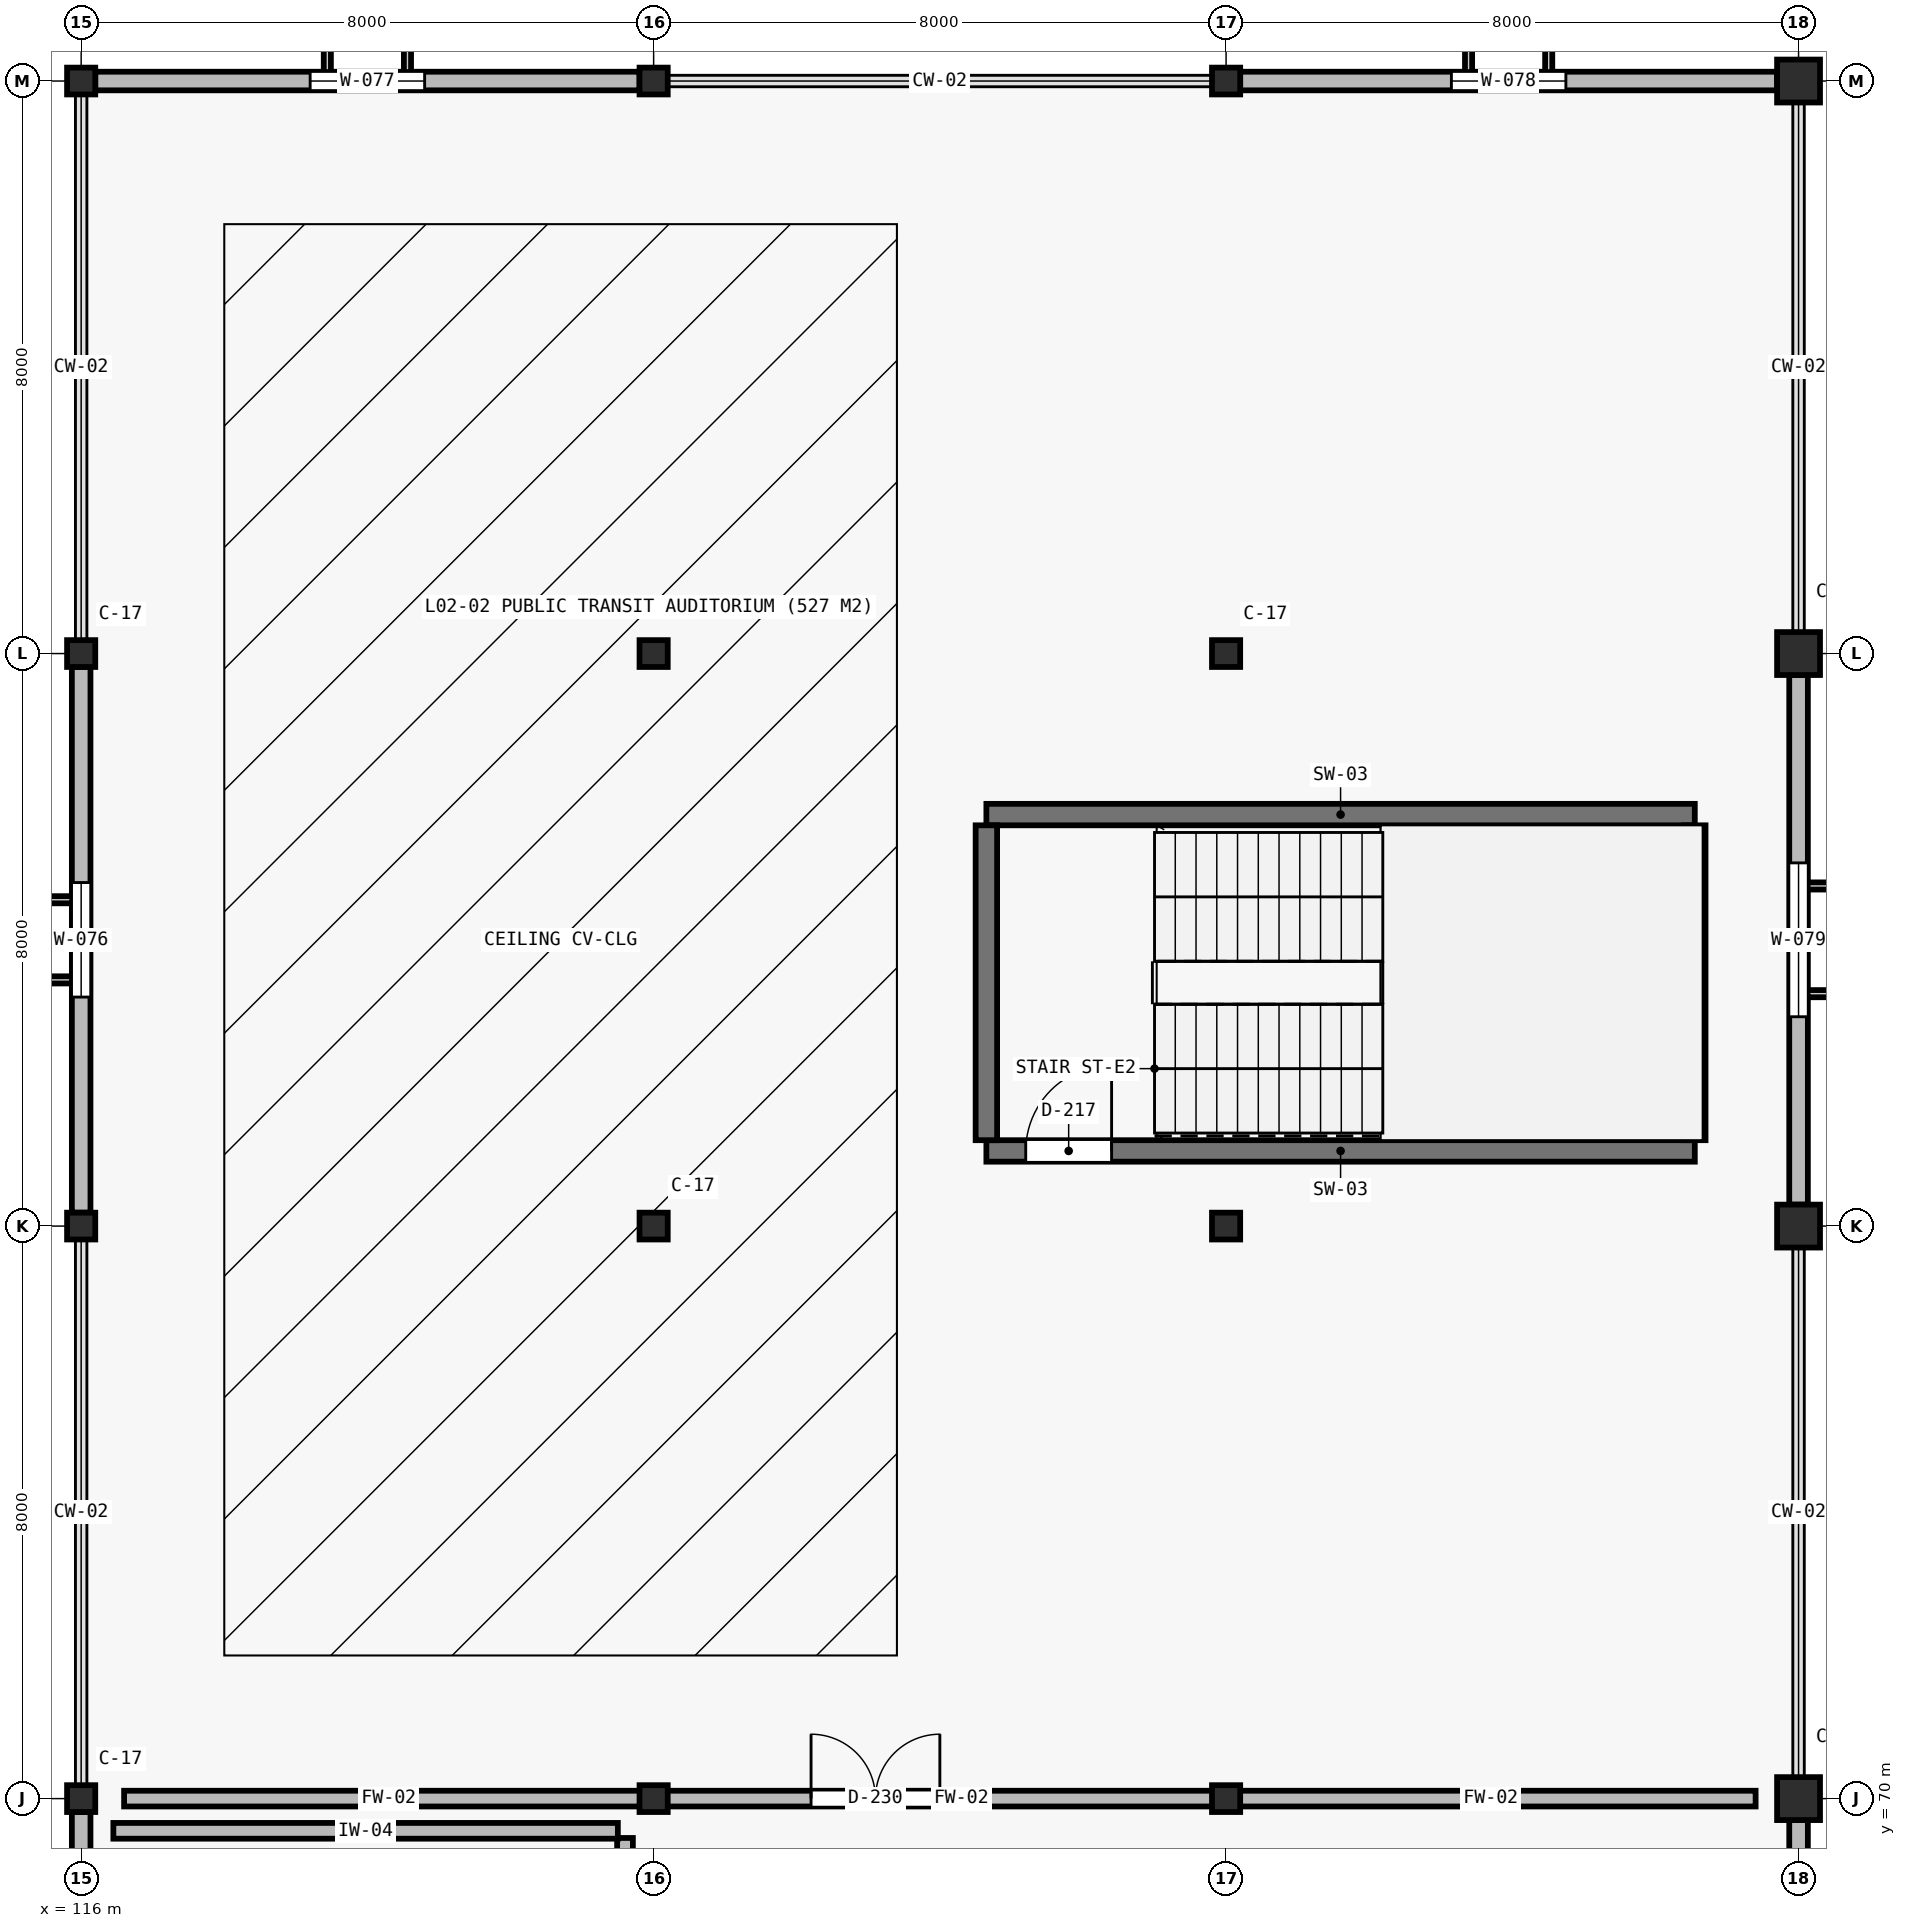
"""IFC4 building model, lengths in metres.
Left out: names, types, materials, properties, quantities, classifications, styles, units other than length and angle.
Written with IfcOpenShell. Run it as: python <this file> out.ifc"""

import sys

from ifc_helpers import new_model, si_unit, direction, frame, frame_2d, origin, origin_2d, place, context, subcontext, project, spatial, rectangle, i_section, extrude, element, fill, save


model = new_model("IFC4")
c1 = context("Model", 3, precision=1e-05, world=origin(), true_north=direction((0.0, 1.0)))
c2 = subcontext(c1, "Body", "Model", "MODEL_VIEW")
j1 = project(units=[si_unit("LENGTHUNIT", "METRE"), si_unit("PLANEANGLEUNIT", "RADIAN")], contexts=[c1])
p1 = place(None, origin())
s1 = spatial("IfcSite", under=j1, at=p1, CompositionType="ELEMENT")
p2 = place(p1, origin())
s2 = spatial("IfcBuilding", under=s1, at=p2, CompositionType="ELEMENT")
p3 = place(p2, frame((0.0, 0.0, 11.2)))
s3 = spatial("IfcBuildingStorey", under=s2, at=p3, CompositionType="ELEMENT", Elevation=11.2)
for number, where, z_axis, x_axis in (
    (1, (116.0, 70.0, 0.0), (0.0, 0.0, 1.0), (1.0, 0.0, 0.0)),
    (2, (116.0, 78.0, 0.0), (0.0, 0.0, 1.0), (1.0, 0.0, 0.0)),
    (3, (116.0, 86.0, 0.0), (0.0, 0.0, 1.0), (1.0, 0.0, 0.0)),
    (4, (116.0, 94.0, 0.0), (0.0, 0.0, 1.0), (1.0, 0.0, 0.0)),
    (5, (124.0, 70.0, 0.0), (0.0, 0.0, 1.0), (1.0, 0.0, 0.0)),
    (6, (124.0, 78.0, 0.0), (0.0, 0.0, 1.0), (1.0, 0.0, 0.0)),
    (7, (124.0, 86.0, 0.0), (0.0, 0.0, 1.0), (1.0, 0.0, 0.0)),
    (8, (124.0, 94.0, 0.0), (0.0, 0.0, 1.0), (1.0, 0.0, 0.0)),
    (9, (132.0, 70.0, 0.0), (0.0, 0.0, 1.0), (1.0, 0.0, 0.0)),
    (10, (132.0, 78.0, 0.0), (0.0, 0.0, 1.0), (1.0, 0.0, 0.0)),
    (11, (132.0, 86.0, 0.0), (0.0, 0.0, 1.0), (1.0, 0.0, 0.0)),
    (12, (132.0, 94.0, 0.0), (0.0, 0.0, 1.0), (1.0, 0.0, 0.0)),
):
    element("IfcColumn", number, at=place(p3, frame(where, z_axis=z_axis, x_axis=x_axis)), inside=s3, PredefinedType="COLUMN", context=c2, shape_type="SweptSolid", body=[
        extrude(i_section(OverallWidth=0.394, OverallDepth=0.375, WebThickness=0.017, FlangeThickness=0.028, at=origin_2d()), origin(), (0.0, 0.0, 1.0), 4.0),
    ])
for number, where, z_axis, x_axis in (
    (13, (140.0, 70.0, 0.0), (0.0, 0.0, 1.0), (1.0, 0.0, 0.0)),
    (14, (140.0, 78.0, 0.0), (0.0, 0.0, 1.0), (1.0, 0.0, 0.0)),
    (15, (140.0, 86.0, 0.0), (0.0, 0.0, 1.0), (1.0, 0.0, 0.0)),
    (16, (140.0, 94.0, 0.0), (0.0, 0.0, 1.0), (1.0, 0.0, 0.0)),
):
    element("IfcColumn", number, at=place(p3, frame(where, z_axis=z_axis, x_axis=x_axis)), inside=s3, PredefinedType="COLUMN", context=c2, shape_type="SweptSolid", body=[
        extrude(rectangle(XDim=0.6, YDim=0.6, at=origin_2d()), origin(), (0.0, 0.0, 1.0), 4.0),
    ])
p4 = place(p3, frame((128.65, 83.75, 0.0), z_axis=(0.0, 0.0, 1.0), x_axis=(1.0, 0.0, 0.0)))
e17 = element("IfcWall", 17, at=p4, inside=s3, PredefinedType="SHEAR", context=c2, shape_type="SweptSolid", body=[
    extrude(rectangle(XDim=9.9, YDim=0.3, at=frame_2d((4.95, 0.0))), origin(), (0.0, 0.0, 1.0), 4.0),
])
p5 = place(p3, frame((128.65, 79.05, 0.0), z_axis=(0.0, 0.0, 1.0), x_axis=(1.0, 0.0, 0.0)))
e18 = element("IfcWall", 18, at=p5, inside=s3, PredefinedType="SHEAR", context=c2, shape_type="SweptSolid", body=[
    extrude(rectangle(XDim=9.9, YDim=0.3, at=frame_2d((4.95, 0.0))), origin(), (0.0, 0.0, 1.0), 4.0),
])
p6 = place(p5, frame((0.55, 0.0, 0.0)))
e19 = element("IfcOpeningElement", 19, at=p6, cuts=e18, PredefinedType="OPENING", context=c2, shape_type="SweptSolid", body=[
    extrude(rectangle(XDim=1.2, YDim=2.2, at=frame_2d((0.6, 1.1))), frame((0.0, 0.16, 0.0), z_axis=(0.0, -1.0, 0.0), x_axis=(1.0, 0.0, 0.0)), (0.0, 0.0, 1.0), 0.32),
])
for number, where, z_axis, x_axis in (
    (20, (128.65, 79.2, 0.0), (0.0, 0.0, 1.0), (0.0, 1.0, 0.0)),
    (21, (138.55, 79.2, 0.0), (0.0, 0.0, 1.0), (0.0, 1.0, 0.0)),
):
    element("IfcWall", number, at=place(p3, frame(where, z_axis=z_axis, x_axis=x_axis)), inside=s3, PredefinedType="SHEAR", context=c2, shape_type="SweptSolid", body=[
        extrude(rectangle(XDim=4.4, YDim=0.3, at=frame_2d((2.2, 0.0))), origin(), (0.0, 0.0, 1.0), 4.0),
    ])
p7 = place(p3, frame((116.0, 62.35, 0.0), z_axis=(0.0, 0.0, 1.0), x_axis=(0.0, 1.0, 0.0)))
e22 = element("IfcWall", 22, at=p7, inside=s3, PredefinedType="STANDARD", context=c2, shape_type="SweptSolid", body=[
    extrude(rectangle(XDim=7.462, YDim=0.26, at=frame_2d((3.731, 0.0))), origin(), (0.0, 0.0, 1.0), 3.25),
])
p8 = place(p7, frame((2.931, 0.0, 0.95)))
e23 = element("IfcOpeningElement", 23, at=p8, cuts=e22, PredefinedType="OPENING", context=c2, shape_type="SweptSolid", body=[
    extrude(rectangle(XDim=1.6, YDim=2.2, at=frame_2d((0.8, 1.1))), frame((0.0, 0.14, 0.0), z_axis=(0.0, -1.0, 0.0), x_axis=(1.0, 0.0, 0.0)), (0.0, 0.0, 1.0), 0.28),
])
p9 = place(p3, frame((116.0, 78.188, 0.0), z_axis=(0.0, 0.0, 1.0), x_axis=(0.0, 1.0, 0.0)))
e24 = element("IfcWall", 24, at=p9, inside=s3, PredefinedType="STANDARD", context=c2, shape_type="SweptSolid", body=[
    extrude(rectangle(XDim=7.625, YDim=0.26, at=frame_2d((3.812, 0.0))), origin(), (0.0, 0.0, 1.0), 3.25),
])
p10 = place(p9, frame((3.012, 0.0, 0.95)))
e25 = element("IfcOpeningElement", 25, at=p10, cuts=e24, PredefinedType="OPENING", context=c2, shape_type="SweptSolid", body=[
    extrude(rectangle(XDim=1.6, YDim=2.2, at=frame_2d((0.8, 1.1))), frame((0.0, 0.14, 0.0), z_axis=(0.0, -1.0, 0.0), x_axis=(1.0, 0.0, 0.0)), (0.0, 0.0, 1.0), 0.28),
])
p11 = place(p3, frame((116.197, 94.0, 0.0), z_axis=(0.0, 0.0, 1.0), x_axis=(1.0, 0.0, 0.0)))
e26 = element("IfcWall", 26, at=p11, inside=s3, PredefinedType="STANDARD", context=c2, shape_type="SweptSolid", body=[
    extrude(rectangle(XDim=7.606, YDim=0.26, at=frame_2d((3.803, 0.0))), origin(), (0.0, 0.0, 1.0), 3.25),
])
p12 = place(p11, frame((3.003, 0.0, 0.95)))
e27 = element("IfcOpeningElement", 27, at=p12, cuts=e26, PredefinedType="OPENING", context=c2, shape_type="SweptSolid", body=[
    extrude(rectangle(XDim=1.6, YDim=2.2, at=frame_2d((0.8, 1.1))), frame((0.0, 0.14, 0.0), z_axis=(0.0, -1.0, 0.0), x_axis=(1.0, 0.0, 0.0)), (0.0, 0.0, 1.0), 0.28),
])
p13 = place(p3, frame((132.197, 94.0, 0.0), z_axis=(0.0, 0.0, 1.0), x_axis=(1.0, 0.0, 0.0)))
e28 = element("IfcWall", 28, at=p13, inside=s3, PredefinedType="STANDARD", context=c2, shape_type="SweptSolid", body=[
    extrude(rectangle(XDim=7.503, YDim=0.26, at=frame_2d((3.751, 0.0))), origin(), (0.0, 0.0, 1.0), 3.25),
])
p14 = place(p13, frame((2.951, 0.0, 0.95)))
e29 = element("IfcOpeningElement", 29, at=p14, cuts=e28, PredefinedType="OPENING", context=c2, shape_type="SweptSolid", body=[
    extrude(rectangle(XDim=1.6, YDim=2.2, at=frame_2d((0.8, 1.1))), frame((0.0, 0.14, 0.0), z_axis=(0.0, -1.0, 0.0), x_axis=(1.0, 0.0, 0.0)), (0.0, 0.0, 1.0), 0.28),
])
p15 = place(p3, frame((140.0, 85.7, 0.0), z_axis=(0.0, 0.0, 1.0), x_axis=(0.0, -1.0, 0.0)))
e30 = element("IfcWall", 30, at=p15, inside=s3, PredefinedType="STANDARD", context=c2, shape_type="SweptSolid", body=[
    extrude(rectangle(XDim=7.4, YDim=0.26, at=frame_2d((3.7, 0.0))), origin(), (0.0, 0.0, 1.0), 3.25),
])
p16 = place(p15, frame((2.625, 0.0, 0.95)))
e31 = element("IfcOpeningElement", 31, at=p16, cuts=e30, PredefinedType="OPENING", context=c2, shape_type="SweptSolid", body=[
    extrude(rectangle(XDim=2.15, YDim=1.5, at=frame_2d((1.075, 0.75))), frame((0.0, 0.14, 0.0), z_axis=(0.0, -1.0, 0.0), x_axis=(1.0, 0.0, 0.0)), (0.0, 0.0, 1.0), 0.28),
])
p17 = place(p3, frame((140.0, 69.7, 0.0), z_axis=(0.0, 0.0, 1.0), x_axis=(0.0, -1.0, 0.0)))
e32 = element("IfcWall", 32, at=p17, inside=s3, PredefinedType="STANDARD", context=c2, shape_type="SweptSolid", body=[
    extrude(rectangle(XDim=7.4, YDim=0.26, at=frame_2d((3.7, 0.0))), origin(), (0.0, 0.0, 1.0), 3.25),
])
p18 = place(p17, frame((2.625, 0.0, 0.95)))
e33 = element("IfcOpeningElement", 33, at=p18, cuts=e32, PredefinedType="OPENING", context=c2, shape_type="SweptSolid", body=[
    extrude(rectangle(XDim=2.15, YDim=1.5, at=frame_2d((1.075, 0.75))), frame((0.0, 0.14, 0.0), z_axis=(0.0, -1.0, 0.0), x_axis=(1.0, 0.0, 0.0)), (0.0, 0.0, 1.0), 0.28),
])
p19 = place(p3, frame((123.6, 62.55, 0.0), z_axis=(0.0, 0.0, 1.0), x_axis=(0.0, 1.0, 0.0)))
e34 = element("IfcWall", 34, at=p19, inside=s3, PredefinedType="PLUMBINGWALL", context=c2, shape_type="SweptSolid", body=[
    extrude(rectangle(XDim=6.9, YDim=0.22, at=frame_2d((3.45, 0.0))), origin(), (0.0, 0.0, 1.0), 4.0),
])
p20 = place(p19, frame((0.65, 0.0, 0.0)))
e35 = element("IfcOpeningElement", 35, at=p20, cuts=e34, PredefinedType="OPENING", context=c2, shape_type="SweptSolid", body=[
    extrude(rectangle(XDim=0.95, YDim=2.1, at=frame_2d((0.475, 1.05))), frame((0.0, 0.12, 0.0), z_axis=(0.0, -1.0, 0.0), x_axis=(1.0, 0.0, 0.0)), (0.0, 0.0, 1.0), 0.24),
])
p21 = place(p19, frame((3.1, 0.0, 0.0)))
e36 = element("IfcOpeningElement", 36, at=p21, cuts=e34, PredefinedType="OPENING", context=c2, shape_type="SweptSolid", body=[
    extrude(rectangle(XDim=0.9, YDim=2.1, at=frame_2d((0.45, 1.05))), frame((0.0, 0.12, 0.0), z_axis=(0.0, -1.0, 0.0), x_axis=(1.0, 0.0, 0.0)), (0.0, 0.0, 1.0), 0.24),
])
p22 = place(p19, frame((5.2, 0.0, 0.0)))
e37 = element("IfcOpeningElement", 37, at=p22, cuts=e34, PredefinedType="OPENING", context=c2, shape_type="SweptSolid", body=[
    extrude(rectangle(XDim=0.9, YDim=2.1, at=frame_2d((0.45, 1.05))), frame((0.0, 0.12, 0.0), z_axis=(0.0, -1.0, 0.0), x_axis=(1.0, 0.0, 0.0)), (0.0, 0.0, 1.0), 0.24),
])
p23 = place(p3, frame((116.45, 69.55, 0.0), z_axis=(0.0, 0.0, 1.0), x_axis=(1.0, 0.0, 0.0)))
e38 = element("IfcWall", 38, at=p23, inside=s3, PredefinedType="PLUMBINGWALL", context=c2, shape_type="SweptSolid", body=[
    extrude(rectangle(XDim=7.05, YDim=0.22, at=frame_2d((3.525, 0.0))), origin(), (0.0, 0.0, 1.0), 4.0),
])
p24 = place(p3, frame((116.6, 70.0, 0.0), z_axis=(0.0, 0.0, 1.0), x_axis=(1.0, 0.0, 0.0)))
e39 = element("IfcWall", 39, at=p24, inside=s3, PredefinedType="SOLIDWALL", context=c2, shape_type="SweptSolid", body=[
    extrude(rectangle(XDim=7.4, YDim=0.22, at=frame_2d((3.7, 0.0))), origin(), (0.0, 0.0, 1.0), 3.25),
])
p25 = place(p3, frame((124.0, 70.0, 0.0), z_axis=(0.0, 0.0, 1.0), x_axis=(1.0, 0.0, 0.0)))
e40 = element("IfcWall", 40, at=p25, inside=s3, PredefinedType="SOLIDWALL", context=c2, shape_type="SweptSolid", body=[
    extrude(rectangle(XDim=8.0, YDim=0.22, at=frame_2d((4.0, 0.0))), origin(), (0.0, 0.0, 1.0), 3.456),
])
p26 = place(p25, frame((2.2, 0.0, 0.0)))
e41 = element("IfcOpeningElement", 41, at=p26, cuts=e40, PredefinedType="OPENING", context=c2, shape_type="SweptSolid", body=[
    extrude(rectangle(XDim=1.8, YDim=2.2, at=frame_2d((0.9, 1.1))), frame((0.0, 0.12, 0.0), z_axis=(0.0, -1.0, 0.0), x_axis=(1.0, 0.0, 0.0)), (0.0, 0.0, 1.0), 0.24),
])
p27 = place(p3, frame((132.0, 70.0, 0.0), z_axis=(0.0, 0.0, 1.0), x_axis=(1.0, 0.0, 0.0)))
e42 = element("IfcWall", 42, at=p27, inside=s3, PredefinedType="SOLIDWALL", context=c2, shape_type="SweptSolid", body=[
    extrude(rectangle(XDim=7.4, YDim=0.22, at=frame_2d((3.7, 0.0))), origin(), (0.0, 0.0, 1.0), 3.25),
])
p28 = place(p10, origin())
e43 = element("IfcWindow", 43, at=p28, inside=s3, PartitioningType="SINGLE_PANEL", PredefinedType="WINDOW", context=c2, shape_type="SweptSolid", body=[
    extrude(rectangle(XDim=1.6, YDim=2.2, at=frame_2d((0.8, 1.1))), frame((0.0, 0.03, 0.0), z_axis=(0.0, -1.0, 0.0), x_axis=(1.0, 0.0, 0.0)), (0.0, 0.0, 1.0), 0.06),
])
fill(e25, e43)
p29 = place(p12, origin())
e44 = element("IfcWindow", 44, at=p29, inside=s3, PartitioningType="SINGLE_PANEL", PredefinedType="WINDOW", context=c2, shape_type="SweptSolid", body=[
    extrude(rectangle(XDim=1.6, YDim=2.2, at=frame_2d((0.8, 1.1))), frame((0.0, 0.03, 0.0), z_axis=(0.0, -1.0, 0.0), x_axis=(1.0, 0.0, 0.0)), (0.0, 0.0, 1.0), 0.06),
])
fill(e27, e44)
p30 = place(p14, origin())
e45 = element("IfcWindow", 45, at=p30, inside=s3, PartitioningType="SINGLE_PANEL", PredefinedType="WINDOW", context=c2, shape_type="SweptSolid", body=[
    extrude(rectangle(XDim=1.6, YDim=2.2, at=frame_2d((0.8, 1.1))), frame((0.0, 0.03, 0.0), z_axis=(0.0, -1.0, 0.0), x_axis=(1.0, 0.0, 0.0)), (0.0, 0.0, 1.0), 0.06),
])
fill(e29, e45)
p31 = place(p16, origin())
e46 = element("IfcWindow", 46, at=p31, inside=s3, PartitioningType="SINGLE_PANEL", PredefinedType="WINDOW", context=c2, shape_type="SweptSolid", body=[
    extrude(rectangle(XDim=2.15, YDim=1.5, at=frame_2d((1.075, 0.75))), frame((0.0, 0.03, 0.0), z_axis=(0.0, -1.0, 0.0), x_axis=(1.0, 0.0, 0.0)), (0.0, 0.0, 1.0), 0.06),
])
fill(e31, e46)
p32 = place(p6, origin())
e47 = element("IfcDoor", 47, at=p32, inside=s3, OperationType="SINGLE_SWING_RIGHT", PredefinedType="DOOR", context=c2, shape_type="SweptSolid", body=[
    extrude(rectangle(XDim=1.2, YDim=2.2, at=frame_2d((0.6, 1.1))), frame((0.0, 0.025, 0.0), z_axis=(0.0, -1.0, 0.0), x_axis=(1.0, 0.0, 0.0)), (0.0, 0.0, 1.0), 0.05),
])
fill(e19, e47)
p33 = place(p26, origin())
e48 = element("IfcDoor", 48, at=p33, inside=s3, OperationType="DOUBLE_DOOR_SINGLE_SWING", PredefinedType="DOOR", context=c2, shape_type="SweptSolid", body=[
    extrude(rectangle(XDim=1.8, YDim=2.2, at=frame_2d((0.9, 1.1))), frame((0.0, 0.025, 0.0), z_axis=(0.0, -1.0, 0.0), x_axis=(1.0, 0.0, 0.0)), (0.0, 0.0, 1.0), 0.05),
])
fill(e41, e48)
save(model, sys.argv[1])
